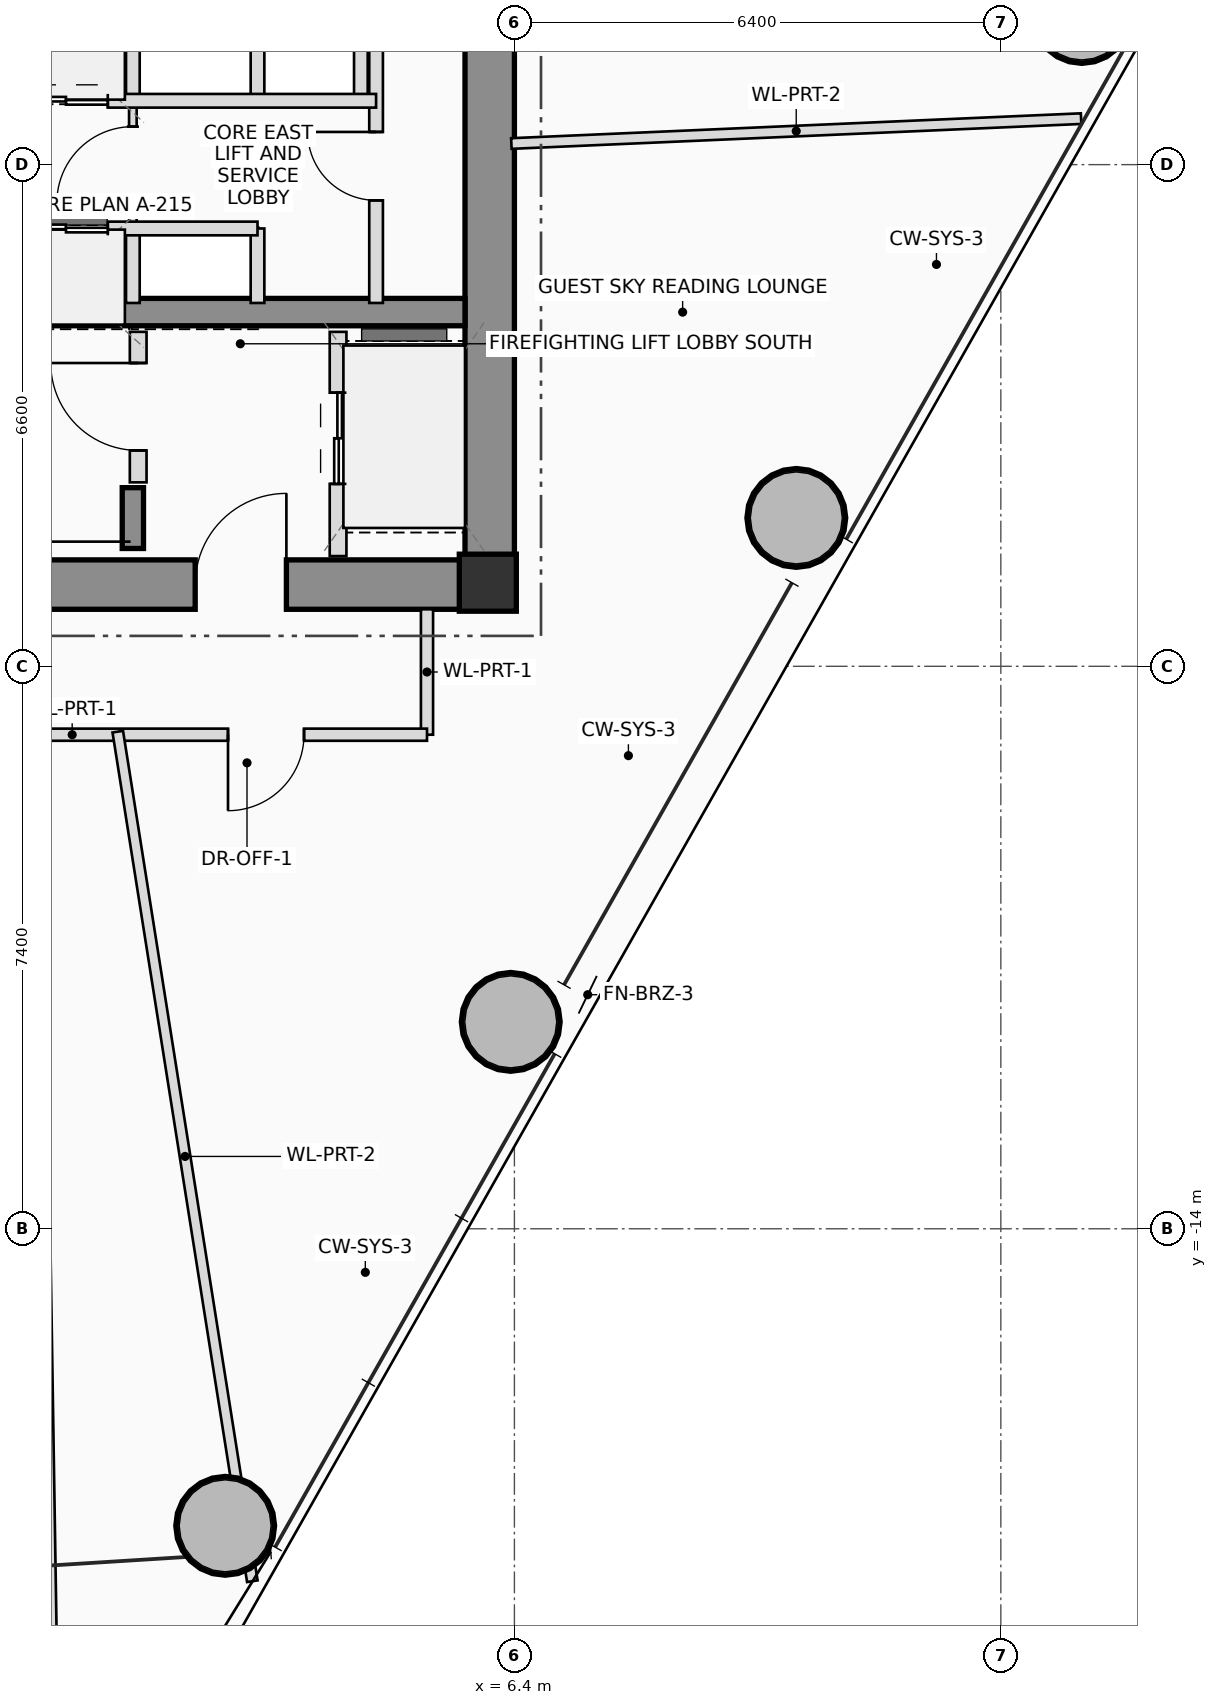
"""IFC4 building model, lengths in metres.
Left out: names, types, materials, properties, quantities, classifications, styles, units other than length and angle.
Written with IfcOpenShell. Run it as: python <this file> out.ifc"""

import sys

from ifc_helpers import new_model, si_unit, direction, frame, frame_2d, origin, origin_2d, place, context, subcontext, project, spatial, rectangle, hollow_circle, extrude, source, transform, mapped, element, fill, save


model = new_model("IFC4")
c1 = context("Model", 3, precision=1e-05, world=origin(), true_north=direction((0.0, 1.0)))
c2 = subcontext(c1, "Body", "Model", "MODEL_VIEW")
j1 = project(units=[si_unit("LENGTHUNIT", "METRE"), si_unit("PLANEANGLEUNIT", "RADIAN")], contexts=[c1])
p1 = place(None, origin())
s1 = spatial("IfcSite", under=j1, at=p1, CompositionType="ELEMENT")
p2 = place(p1, origin())
s2 = spatial("IfcBuilding", under=s1, at=p2, CompositionType="ELEMENT")
p3 = place(p2, frame((0.0, 0.0, 162.2)))
s3 = spatial("IfcBuildingStorey", under=s2, at=p3, CompositionType="ELEMENT", Elevation=162.2)
m1 = source(origin(), c2, "Body", "SweptSolid", [
    extrude(rectangle(XDim=0.75, YDim=0.75, at=origin_2d()), origin(), (0.0, 0.0, 1.0), 3.45),
])
p4 = place(p3, frame((6.05, -5.5, 0.0), z_axis=(0.0, 0.0, 1.0), x_axis=(1.0, 0.0, 0.0)))
e1 = element("IfcColumn", 1, at=p4, inside=s3, PredefinedType="COLUMN", context=c2, shape_type="MappedRepresentation", body=[
    mapped(m1, transform((0.0, 0.0, 0.0), scale=1.0)),
])
p5 = place(p3, frame((-6.4, -5.525, 0.0), z_axis=(0.0, 0.0, 1.0), x_axis=(1.0, 0.0, 0.0)))
e2 = element("IfcWall", 2, at=p5, inside=s3, PredefinedType="SHEAR", context=c2, shape_type="SweptSolid", body=[
    extrude(rectangle(XDim=12.8, YDim=0.65, at=frame_2d((6.4, 0.0))), origin(), (0.0, 0.0, 1.0), 3.45),
])
p6 = place(p5, frame((8.6, 0.0, 0.0)))
e3 = element("IfcOpeningElement", 3, at=p6, cuts=e2, PredefinedType="OPENING", context=c2, shape_type="SweptSolid", body=[
    extrude(rectangle(XDim=1.2, YDim=2.2, at=frame_2d((0.6, 1.1))), frame((0.0, 0.335, 0.0), z_axis=(0.0, -1.0, 0.0), x_axis=(1.0, 0.0, 0.0)), (0.0, 0.0, 1.0), 0.67),
])
p7 = place(p3, frame((6.075, -5.2, 0.0), z_axis=(0.0, 0.0, 1.0), x_axis=(0.0, 1.0, 0.0)))
e4 = element("IfcWall", 4, at=p7, inside=s3, PredefinedType="SHEAR", context=c2, shape_type="SweptSolid", body=[
    extrude(rectangle(XDim=10.4, YDim=0.65, at=frame_2d((5.2, 0.0))), origin(), (0.0, 0.0, 1.0), 3.45),
])
p8 = place(p3, frame((-5.75, -1.94, 0.0), z_axis=(0.0, 0.0, 1.0), x_axis=(1.0, 0.0, 0.0)))
e5 = element("IfcWall", 5, at=p8, inside=s3, PredefinedType="SHEAR", context=c2, shape_type="SweptSolid", body=[
    extrude(rectangle(XDim=11.5, YDim=0.36, at=frame_2d((5.75, 0.0))), origin(), (0.0, 0.0, 1.0), 3.45),
])
p9 = place(p3, frame((1.38, -5.05, 0.0), z_axis=(0.0, 0.0, 1.0), x_axis=(0.0, 1.0, 0.0)))
e6 = element("IfcWall", 6, at=p9, inside=s3, PredefinedType="SHEAR", context=c2, shape_type="SweptSolid", body=[
    extrude(rectangle(XDim=0.8, YDim=0.28, at=frame_2d((0.4, 0.0))), origin(), (0.0, 0.0, 1.0), 3.45),
])
m2 = source(origin(), c2, "Body", "SweptSolid", [
    extrude(hollow_circle(Radius=0.65, WallThickness=0.045, at=origin_2d()), origin(), (0.0, 0.0, 1.0), 3.45),
])
for number, where, z_axis, x_axis in (
    (7, (2.595, -17.908, 0.0), (0.0, 0.0, 1.0), (1.0, 0.0, 0.0)),
    (8, (6.352, -11.278, 0.0), (0.0, 0.0, 1.0), (1.0, 0.0, 0.0)),
    (9, (10.109, -4.648, 0.0), (0.0, 0.0, 1.0), (1.0, 0.0, 0.0)),
    (10, (13.866, 1.982, 0.0), (0.0, 0.0, 1.0), (1.0, 0.0, 0.0)),
):
    element("IfcColumn", number, at=place(p3, frame(where, z_axis=z_axis, x_axis=x_axis)), inside=s3, PredefinedType="COLUMN", context=c2, shape_type="MappedRepresentation", body=[
        mapped(m2, transform((0.0, 0.0, 0.0), scale=1.0)),
    ])
p10 = place(p3, frame((1.45, -4.18, 0.0), z_axis=(0.0, 0.0, 1.0), x_axis=(0.0, 1.0, 0.0)))
e11 = element("IfcWall", 11, at=p10, inside=s3, PredefinedType="PLUMBINGWALL", context=c2, shape_type="SweptSolid", body=[
    extrude(rectangle(XDim=1.98, YDim=0.22, at=frame_2d((0.99, 0.0))), origin(), (0.0, 0.0, 1.0), 3.25),
])
p11 = place(p10, frame((0.42, 0.0, 0.0)))
e12 = element("IfcOpeningElement", 12, at=p11, cuts=e11, PredefinedType="OPENING", context=c2, shape_type="SweptSolid", body=[
    extrude(rectangle(XDim=1.15, YDim=2.15, at=frame_2d((0.575, 1.075))), frame((0.0, 0.12, 0.0), z_axis=(0.0, -1.0, 0.0), x_axis=(1.0, 0.0, 0.0)), (0.0, 0.0, 1.0), 0.24),
])
p12 = place(p3, frame((4.08, -5.15, 0.0), z_axis=(0.0, 0.0, 1.0), x_axis=(0.0, 1.0, 0.0)))
e13 = element("IfcWall", 13, at=p12, inside=s3, PredefinedType="PLUMBINGWALL", context=c2, shape_type="SweptSolid", body=[
    extrude(rectangle(XDim=2.95, YDim=0.22, at=frame_2d((1.475, 0.0))), origin(), (0.0, 0.0, 1.0), 3.25),
])
p13 = place(p12, frame((0.95, 0.0, 0.0)))
e14 = element("IfcOpeningElement", 14, at=p13, cuts=e13, PredefinedType="OPENING", context=c2, shape_type="SweptSolid", body=[
    extrude(rectangle(XDim=1.2, YDim=2.25, at=frame_2d((0.6, 1.125))), frame((0.0, 0.12, 0.0), z_axis=(0.0, -1.0, 0.0), x_axis=(1.0, 0.0, 0.0)), (0.0, 0.0, 1.0), 0.24),
])
p14 = place(p3, frame((1.38, -0.84, 0.0), z_axis=(0.0, 0.0, 1.0), x_axis=(0.0, 1.0, 0.0)))
e15 = element("IfcWall", 15, at=p14, inside=s3, PredefinedType="PARTITIONING", context=c2, shape_type="SweptSolid", body=[
    extrude(rectangle(XDim=1.68, YDim=0.1, at=frame_2d((0.84, 0.0))), origin(), (0.0, 0.0, 1.0), 3.25),
])
p15 = place(p14, frame((0.34, 0.0, 0.0)))
e16 = element("IfcOpeningElement", 16, at=p15, cuts=e15, PredefinedType="OPENING", context=c2, shape_type="SweptSolid", body=[
    extrude(rectangle(XDim=1.0, YDim=2.25, at=frame_2d((0.5, 1.125))), frame((0.0, 0.06, 0.0), z_axis=(0.0, -1.0, 0.0), x_axis=(1.0, 0.0, 0.0)), (0.0, 0.0, 1.0), 0.12),
])
for number, where, z_axis, x_axis in (
    (17, (1.38, 0.84, 0.0), (0.0, 0.0, 1.0), (0.0, 1.0, 0.0)),
    (18, (1.38, -1.82, 0.0), (0.0, 0.0, 1.0), (0.0, 1.0, 0.0)),
    (19, (3.02, 0.84, 0.0), (0.0, 0.0, 1.0), (0.0, 1.0, 0.0)),
    (20, (4.38, 0.84, 0.0), (0.0, 0.0, 1.0), (0.0, 1.0, 0.0)),
    (21, (3.02, -1.82, 0.0), (0.0, 0.0, 1.0), (0.0, 1.0, 0.0)),
):
    element("IfcWall", number, at=place(p3, frame(where, z_axis=z_axis, x_axis=x_axis)), inside=s3, PredefinedType="PLUMBINGWALL", context=c2, shape_type="SweptSolid", body=[
        extrude(rectangle(XDim=0.98, YDim=0.18, at=frame_2d((0.49, 0.0))), origin(), (0.0, 0.0, 1.0), 3.25),
    ])
p16 = place(p3, frame((4.58, -1.82, 0.0), z_axis=(0.0, 0.0, 1.0), x_axis=(0.0, 1.0, 0.0)))
e22 = element("IfcWall", 22, at=p16, inside=s3, PredefinedType="PLUMBINGWALL", context=c2, shape_type="SweptSolid", body=[
    extrude(rectangle(XDim=3.64, YDim=0.18, at=frame_2d((1.82, 0.0))), origin(), (0.0, 0.0, 1.0), 3.25),
])
p17 = place(p16, frame((1.35, 0.0, 0.0)))
e23 = element("IfcOpeningElement", 23, at=p17, cuts=e22, PredefinedType="OPENING", context=c2, shape_type="SweptSolid", body=[
    extrude(rectangle(XDim=0.9, YDim=2.05, at=frame_2d((0.45, 1.025))), frame((0.0, 0.1, 0.0), z_axis=(0.0, -1.0, 0.0), x_axis=(1.0, 0.0, 0.0)), (0.0, 0.0, 1.0), 0.2),
])
p18 = place(p3, frame((-5.68, 0.84, 0.0), z_axis=(0.0, 0.0, 1.0), x_axis=(1.0, 0.0, 0.0)))
e24 = element("IfcWall", 24, at=p18, inside=s3, PredefinedType="PLUMBINGWALL", context=c2, shape_type="SweptSolid", body=[
    extrude(rectangle(XDim=10.26, YDim=0.18, at=frame_2d((5.13, 0.0))), origin(), (0.0, 0.0, 1.0), 3.25),
])
p19 = place(p18, frame((1.08, 0.0, 0.0)))
e25 = element("IfcOpeningElement", 25, at=p19, cuts=e24, PredefinedType="OPENING", context=c2, shape_type="SweptSolid", body=[
    extrude(rectangle(XDim=0.9, YDim=2.05, at=frame_2d((0.45, 1.025))), frame((0.0, 0.1, 0.0), z_axis=(0.0, -1.0, 0.0), x_axis=(1.0, 0.0, 0.0)), (0.0, 0.0, 1.0), 0.2),
])
p20 = place(p18, frame((3.93, 0.0, 0.0)))
e26 = element("IfcOpeningElement", 26, at=p20, cuts=e24, PredefinedType="OPENING", context=c2, shape_type="SweptSolid", body=[
    extrude(rectangle(XDim=1.1, YDim=2.2, at=frame_2d((0.55, 1.1))), frame((0.0, 0.1, 0.0), z_axis=(0.0, -1.0, 0.0), x_axis=(1.0, 0.0, 0.0)), (0.0, 0.0, 1.0), 0.2),
])
p21 = place(p18, frame((5.63, 0.0, 0.0)))
e27 = element("IfcOpeningElement", 27, at=p21, cuts=e24, PredefinedType="OPENING", context=c2, shape_type="SweptSolid", body=[
    extrude(rectangle(XDim=1.1, YDim=2.2, at=frame_2d((0.55, 1.1))), frame((0.0, 0.1, 0.0), z_axis=(0.0, -1.0, 0.0), x_axis=(1.0, 0.0, 0.0)), (0.0, 0.0, 1.0), 0.2),
])
p22 = place(p3, frame((-5.68, -0.84, 0.0), z_axis=(0.0, 0.0, 1.0), x_axis=(1.0, 0.0, 0.0)))
e28 = element("IfcWall", 28, at=p22, inside=s3, PredefinedType="PLUMBINGWALL", context=c2, shape_type="SweptSolid", body=[
    extrude(rectangle(XDim=8.7, YDim=0.18, at=frame_2d((4.35, 0.0))), origin(), (0.0, 0.0, 1.0), 3.25),
])
p23 = place(p22, frame((1.68, 0.0, 0.0)))
e29 = element("IfcOpeningElement", 29, at=p23, cuts=e28, PredefinedType="OPENING", context=c2, shape_type="SweptSolid", body=[
    extrude(rectangle(XDim=0.9, YDim=2.05, at=frame_2d((0.45, 1.025))), frame((0.0, 0.1, 0.0), z_axis=(0.0, -1.0, 0.0), x_axis=(1.0, 0.0, 0.0)), (0.0, 0.0, 1.0), 0.2),
])
p24 = place(p22, frame((3.93, 0.0, 0.0)))
e30 = element("IfcOpeningElement", 30, at=p24, cuts=e28, PredefinedType="OPENING", context=c2, shape_type="SweptSolid", body=[
    extrude(rectangle(XDim=1.1, YDim=2.2, at=frame_2d((0.55, 1.1))), frame((0.0, 0.1, 0.0), z_axis=(0.0, -1.0, 0.0), x_axis=(1.0, 0.0, 0.0)), (0.0, 0.0, 1.0), 0.2),
])
p25 = place(p22, frame((5.63, 0.0, 0.0)))
e31 = element("IfcOpeningElement", 31, at=p25, cuts=e28, PredefinedType="OPENING", context=c2, shape_type="SweptSolid", body=[
    extrude(rectangle(XDim=1.1, YDim=2.2, at=frame_2d((0.55, 1.1))), frame((0.0, 0.1, 0.0), z_axis=(0.0, -1.0, 0.0), x_axis=(1.0, 0.0, 0.0)), (0.0, 0.0, 1.0), 0.2),
])
p26 = place(p3, frame((5.25, -5.85, 0.0), z_axis=(0.0, 0.0, 1.0), x_axis=(0.0, -1.0, 0.0)))
e32 = element("IfcWall", 32, at=p26, inside=s3, PredefinedType="PARTITIONING", context=c2, shape_type="SweptSolid", body=[
    extrude(rectangle(XDim=1.65, YDim=0.16, at=frame_2d((0.825, 0.0))), origin(), (0.0, 0.0, 1.0), 3.25),
])
p27 = place(p3, frame((5.25, -7.5, 0.0), z_axis=(0.0, 0.0, 1.0), x_axis=(-1.0, 0.0, 0.0)))
e33 = element("IfcWall", 33, at=p27, inside=s3, PredefinedType="PARTITIONING", context=c2, shape_type="SweptSolid", body=[
    extrude(rectangle(XDim=11.61, YDim=0.16, at=frame_2d((5.805, 0.0))), origin(), (0.0, 0.0, 1.0), 2.605),
])
p28 = place(p27, frame((1.618, 0.0, 0.0)))
e34 = element("IfcOpeningElement", 34, at=p28, cuts=e33, PredefinedType="OPENING", context=c2, shape_type="SweptSolid", body=[
    extrude(rectangle(XDim=1.0, YDim=2.25, at=frame_2d((0.5, 1.125))), frame((0.0, 0.09, 0.0), z_axis=(0.0, -1.0, 0.0), x_axis=(1.0, 0.0, 0.0)), (0.0, 0.0, 1.0), 0.18),
])
p29 = place(p27, frame((6.719, 0.0, 0.0)))
e35 = element("IfcOpeningElement", 35, at=p29, cuts=e33, PredefinedType="OPENING", context=c2, shape_type="SweptSolid", body=[
    extrude(rectangle(XDim=1.0, YDim=2.25, at=frame_2d((0.5, 1.125))), frame((0.0, 0.09, 0.0), z_axis=(0.0, -1.0, 0.0), x_axis=(1.0, 0.0, 0.0)), (0.0, 0.0, 1.0), 0.18),
])
p30 = place(p3, frame((6.36, 0.278, 0.0), z_axis=(0.0, 0.0, 1.0), x_axis=(0.999047543566, 0.043634913719, 0.0)))
e36 = element("IfcWall", 36, at=p30, inside=s3, PredefinedType="PARTITIONING", context=c2, shape_type="SweptSolid", body=[
    extrude(rectangle(XDim=7.503, YDim=0.14, at=frame_2d((3.751, 0.0))), origin(), (0.0, 0.0, 1.0), 2.605),
])
p31 = place(p3, frame((0.118, -7.46, 0.0), z_axis=(0.0, 0.0, 1.0), x_axis=(0.015859383496, -0.999874232069, 0.0)))
e37 = element("IfcWall", 37, at=p31, inside=s3, PredefinedType="PARTITIONING", context=c2, shape_type="SweptSolid", body=[
    extrude(rectangle(XDim=13.655, YDim=0.14, at=frame_2d((6.827, 0.0))), origin(), (0.0, 0.0, 1.0), 2.765),
])
p32 = place(p3, frame((1.181, -7.46, 0.0), z_axis=(0.0, 0.0, 1.0), x_axis=(0.156458885844, -0.98768447241, 0.0)))
e38 = element("IfcWall", 38, at=p32, inside=s3, PredefinedType="PARTITIONING", context=c2, shape_type="SweptSolid", body=[
    extrude(rectangle(XDim=11.316, YDim=0.14, at=frame_2d((5.658, 0.0))), origin(), (0.0, 0.0, 1.0), 2.605),
])
p33 = place(p6, origin())
e39 = element("IfcDoor", 39, at=p33, inside=s3, OperationType="SINGLE_SWING_RIGHT", PredefinedType="DOOR", context=c2, shape_type="SweptSolid", body=[
    extrude(rectangle(XDim=1.2, YDim=2.2, at=frame_2d((0.6, 1.1))), frame((0.0, 0.025, 0.0), z_axis=(0.0, -1.0, 0.0), x_axis=(1.0, 0.0, 0.0)), (0.0, 0.0, 1.0), 0.05),
])
fill(e3, e39)
p34 = place(p11, origin())
e40 = element("IfcDoor", 40, at=p34, inside=s3, OperationType="SINGLE_SWING_RIGHT", PredefinedType="DOOR", context=c2, shape_type="SweptSolid", body=[
    extrude(rectangle(XDim=1.15, YDim=2.15, at=frame_2d((0.575, 1.075))), frame((0.0, 0.025, 0.0), z_axis=(0.0, -1.0, 0.0), x_axis=(1.0, 0.0, 0.0)), (0.0, 0.0, 1.0), 0.05),
])
fill(e12, e40)
p35 = place(p13, origin())
e41 = element("IfcDoor", 41, at=p35, inside=s3, OperationType="DOUBLE_DOOR_SLIDING", PredefinedType="DOOR", context=c2, shape_type="SweptSolid", body=[
    extrude(rectangle(XDim=1.2, YDim=2.25, at=frame_2d((0.6, 1.125))), frame((0.0, 0.025, 0.0), z_axis=(0.0, -1.0, 0.0), x_axis=(1.0, 0.0, 0.0)), (0.0, 0.0, 1.0), 0.05),
])
fill(e14, e41)
p36 = place(p15, origin())
e42 = element("IfcDoor", 42, at=p36, inside=s3, OperationType="SINGLE_SWING_LEFT", PredefinedType="DOOR", context=c2, shape_type="SweptSolid", body=[
    extrude(rectangle(XDim=1.0, YDim=2.25, at=frame_2d((0.5, 1.125))), frame((0.0, 0.025, 0.0), z_axis=(0.0, -1.0, 0.0), x_axis=(1.0, 0.0, 0.0)), (0.0, 0.0, 1.0), 0.05),
])
fill(e16, e42)
p37 = place(p17, origin())
e43 = element("IfcDoor", 43, at=p37, inside=s3, OperationType="SINGLE_SWING_RIGHT", PredefinedType="DOOR", context=c2, shape_type="SweptSolid", body=[
    extrude(rectangle(XDim=0.9, YDim=2.05, at=frame_2d((0.45, 1.025))), frame((0.0, 0.025, 0.0), z_axis=(0.0, -1.0, 0.0), x_axis=(1.0, 0.0, 0.0)), (0.0, 0.0, 1.0), 0.05),
])
fill(e23, e43)
p38 = place(p21, origin())
e44 = element("IfcDoor", 44, at=p38, inside=s3, OperationType="DOUBLE_DOOR_SLIDING", PredefinedType="DOOR", context=c2, shape_type="SweptSolid", body=[
    extrude(rectangle(XDim=1.1, YDim=2.2, at=frame_2d((0.55, 1.1))), frame((0.0, 0.025, 0.0), z_axis=(0.0, -1.0, 0.0), x_axis=(1.0, 0.0, 0.0)), (0.0, 0.0, 1.0), 0.05),
])
fill(e27, e44)
p39 = place(p25, origin())
e45 = element("IfcDoor", 45, at=p39, inside=s3, OperationType="DOUBLE_DOOR_SLIDING", PredefinedType="DOOR", context=c2, shape_type="SweptSolid", body=[
    extrude(rectangle(XDim=1.1, YDim=2.2, at=frame_2d((0.55, 1.1))), frame((0.0, 0.025, 0.0), z_axis=(0.0, -1.0, 0.0), x_axis=(1.0, 0.0, 0.0)), (0.0, 0.0, 1.0), 0.05),
])
fill(e31, e45)
p40 = place(p28, origin())
e46 = element("IfcDoor", 46, at=p40, inside=s3, OperationType="SINGLE_SWING_RIGHT", PredefinedType="DOOR", context=c2, shape_type="SweptSolid", body=[
    extrude(rectangle(XDim=1.0, YDim=2.25, at=frame_2d((0.5, 1.125))), frame((0.0, 0.025, 0.0), z_axis=(0.0, -1.0, 0.0), x_axis=(1.0, 0.0, 0.0)), (0.0, 0.0, 1.0), 0.05),
])
fill(e34, e46)
save(model, sys.argv[1])
